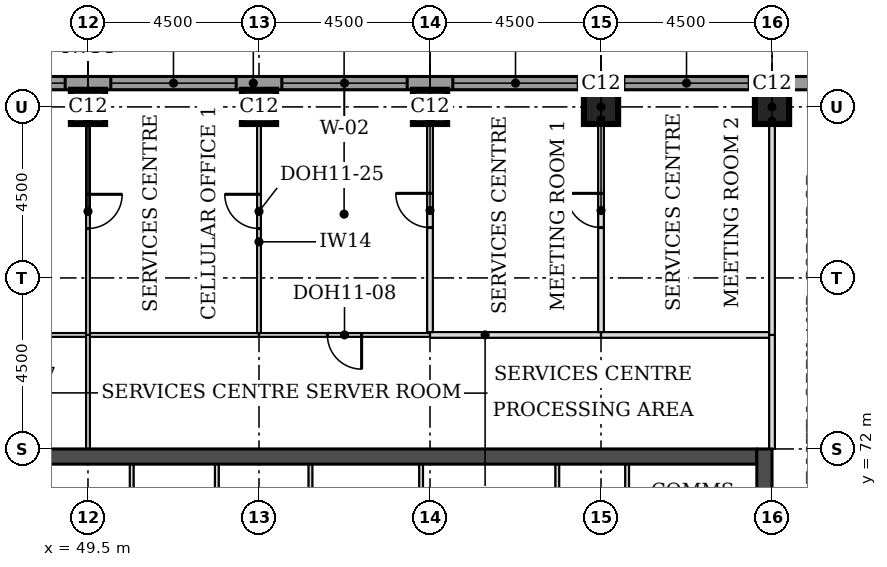
"""IFC4 building model, lengths in metres.
Left out: names, types, materials, properties, quantities, classifications, styles, units other than length and angle.
Written with IfcOpenShell. Run it as: python <this file> out.ifc"""

import sys

from ifc_helpers import new_model, si_unit, direction, frame, frame_2d, origin, origin_2d, place, context, subcontext, project, spatial, rectangle, extrude, element, fill, save


model = new_model("IFC4")
c1 = context("Model", 3, precision=1e-05, world=origin(), true_north=direction((0.0, 1.0)))
c2 = subcontext(c1, "Body", "Model", "MODEL_VIEW")
j1 = project(units=[si_unit("LENGTHUNIT", "METRE"), si_unit("PLANEANGLEUNIT", "RADIAN")], contexts=[c1])
p1 = place(None, origin())
s1 = spatial("IfcSite", under=j1, at=p1, CompositionType="ELEMENT")
p2 = place(p1, origin())
s2 = spatial("IfcBuilding", under=s1, at=p2, CompositionType="ELEMENT")
p3 = place(p2, frame((0.0, 0.0, 234.1)))
s3 = spatial("IfcBuildingStorey", under=s2, at=p3, CompositionType="ELEMENT", Elevation=234.1)
for number, where, z_axis, x_axis in (
    (1, (49.5, 81.0, 0.0), (0.0, 0.0, 1.0), (1.0, 0.0, 0.0)),
    (2, (54.0, 81.0, 0.0), (0.0, 0.0, 1.0), (1.0, 0.0, 0.0)),
    (3, (58.5, 81.0, 0.0), (0.0, 0.0, 1.0), (1.0, 0.0, 0.0)),
    (4, (63.0, 81.0, 0.0), (0.0, 0.0, 1.0), (1.0, 0.0, 0.0)),
    (5, (67.5, 81.0, 0.0), (0.0, 0.0, 1.0), (1.0, 0.0, 0.0)),
):
    element("IfcColumn", number, at=place(p3, frame(where, z_axis=z_axis, x_axis=x_axis)), inside=s3, PredefinedType="COLUMN", context=c2, shape_type="SweptSolid", body=[
        extrude(rectangle(XDim=0.9, YDim=0.9, at=origin_2d()), origin(), (0.0, 0.0, 1.0), 3.7),
    ])
p4 = place(p3, frame((45.4, 71.8, 0.0), z_axis=(0.0, 0.0, 1.0), x_axis=(1.0, 0.0, 0.0)))
e6 = element("IfcWall", 6, at=p4, inside=s3, PredefinedType="SHEAR", context=c2, shape_type="SweptSolid", body=[
    extrude(rectangle(XDim=21.7, YDim=0.4, at=frame_2d((10.85, 0.0))), origin(), (0.0, 0.0, 1.0), 3.7),
])
p5 = place(p3, frame((67.3, 49.5, 0.0), z_axis=(0.0, 0.0, 1.0), x_axis=(0.0, 1.0, 0.0)))
e7 = element("IfcWall", 7, at=p5, inside=s3, PredefinedType="SHEAR", context=c2, shape_type="SweptSolid", body=[
    extrude(rectangle(XDim=22.5, YDim=0.4, at=frame_2d((11.25, 0.0))), origin(), (0.0, 0.0, 1.0), 3.7),
])
p6 = place(p5, frame((4.2, 0.0, 0.0)))
e8 = element("IfcOpeningElement", 8, at=p6, cuts=e7, PredefinedType="OPENING", context=c2, shape_type="SweptSolid", body=[
    extrude(rectangle(XDim=1.8, YDim=2.1, at=frame_2d((0.9, 1.05))), frame((0.0, 0.21, 0.0), z_axis=(0.0, -1.0, 0.0), x_axis=(1.0, 0.0, 0.0)), (0.0, 0.0, 1.0), 0.42),
])
p7 = place(p5, frame((6.9, 0.0, 0.0)))
e9 = element("IfcOpeningElement", 9, at=p7, cuts=e7, PredefinedType="OPENING", context=c2, shape_type="SweptSolid", body=[
    extrude(rectangle(XDim=1.1, YDim=2.1, at=frame_2d((0.55, 1.05))), frame((0.0, 0.21, 0.0), z_axis=(0.0, -1.0, 0.0), x_axis=(1.0, 0.0, 0.0)), (0.0, 0.0, 1.0), 0.42),
])
p8 = place(p5, frame((13.6, 0.0, 0.0)))
e10 = element("IfcOpeningElement", 10, at=p8, cuts=e7, PredefinedType="OPENING", context=c2, shape_type="SweptSolid", body=[
    extrude(rectangle(XDim=1.1, YDim=2.1, at=frame_2d((0.55, 1.05))), frame((0.0, 0.21, 0.0), z_axis=(0.0, -1.0, 0.0), x_axis=(1.0, 0.0, 0.0)), (0.0, 0.0, 1.0), 0.42),
])
p9 = place(p5, frame((16.5, 0.0, 0.0)))
e11 = element("IfcOpeningElement", 11, at=p9, cuts=e7, PredefinedType="OPENING", context=c2, shape_type="SweptSolid", body=[
    extrude(rectangle(XDim=1.8, YDim=2.1, at=frame_2d((0.9, 1.05))), frame((0.0, 0.21, 0.0), z_axis=(0.0, -1.0, 0.0), x_axis=(1.0, 0.0, 0.0)), (0.0, 0.0, 1.0), 0.42),
])
p10 = place(p3, frame((72.331, 81.625, 0.0), z_axis=(0.0, 0.0, 1.0), x_axis=(-1.0, 0.0, 0.0)))
e12 = element("IfcWall", 12, at=p10, inside=s3, PredefinedType="STANDARD", context=c2, shape_type="SweptSolid", body=[
    extrude(rectangle(XDim=32.163, YDim=0.35, at=frame_2d((16.081, 0.0))), origin(), (0.0, 0.0, 1.0), 3.525),
])
p11 = place(p10, frame((5.431, 0.0, 0.9)))
e13 = element("IfcOpeningElement", 13, at=p11, cuts=e12, PredefinedType="OPENING", context=c2, shape_type="SweptSolid", body=[
    extrude(rectangle(XDim=3.3, YDim=1.9, at=frame_2d((1.65, 0.95))), frame((0.0, 0.185, 0.0), z_axis=(0.0, -1.0, 0.0), x_axis=(1.0, 0.0, 0.0)), (0.0, 0.0, 1.0), 0.37),
])
p12 = place(p10, frame((9.931, 0.0, 0.9)))
e14 = element("IfcOpeningElement", 14, at=p12, cuts=e12, PredefinedType="OPENING", context=c2, shape_type="SweptSolid", body=[
    extrude(rectangle(XDim=3.3, YDim=1.9, at=frame_2d((1.65, 0.95))), frame((0.0, 0.185, 0.0), z_axis=(0.0, -1.0, 0.0), x_axis=(1.0, 0.0, 0.0)), (0.0, 0.0, 1.0), 0.37),
])
p13 = place(p10, frame((14.431, 0.0, 0.9)))
e15 = element("IfcOpeningElement", 15, at=p13, cuts=e12, PredefinedType="OPENING", context=c2, shape_type="SweptSolid", body=[
    extrude(rectangle(XDim=3.3, YDim=1.9, at=frame_2d((1.65, 0.95))), frame((0.0, 0.185, 0.0), z_axis=(0.0, -1.0, 0.0), x_axis=(1.0, 0.0, 0.0)), (0.0, 0.0, 1.0), 0.37),
])
p14 = place(p10, frame((18.931, 0.0, 0.9)))
e16 = element("IfcOpeningElement", 16, at=p14, cuts=e12, PredefinedType="OPENING", context=c2, shape_type="SweptSolid", body=[
    extrude(rectangle(XDim=3.3, YDim=1.9, at=frame_2d((1.65, 0.95))), frame((0.0, 0.185, 0.0), z_axis=(0.0, -1.0, 0.0), x_axis=(1.0, 0.0, 0.0)), (0.0, 0.0, 1.0), 0.37),
])
p15 = place(p10, frame((23.431, 0.0, 0.9)))
e17 = element("IfcOpeningElement", 17, at=p15, cuts=e12, PredefinedType="OPENING", context=c2, shape_type="SweptSolid", body=[
    extrude(rectangle(XDim=3.3, YDim=1.9, at=frame_2d((1.65, 0.95))), frame((0.0, 0.185, 0.0), z_axis=(0.0, -1.0, 0.0), x_axis=(1.0, 0.0, 0.0)), (0.0, 0.0, 1.0), 0.37),
])
p16 = place(p3, frame((45.075, 75.0, 0.0), z_axis=(0.0, 0.0, 1.0), x_axis=(1.0, 0.0, 0.0)))
e18 = element("IfcWall", 18, at=p16, inside=s3, PredefinedType="PARTITIONING", context=c2, shape_type="SweptSolid", body=[
    extrude(rectangle(XDim=4.375, YDim=0.1, at=frame_2d((2.188, 0.0))), origin(), (0.0, 0.0, 1.0), 3.55),
])
p17 = place(p16, frame((1.75, 0.0, 0.0)))
e19 = element("IfcOpeningElement", 19, at=p17, cuts=e18, PredefinedType="OPENING", context=c2, shape_type="SweptSolid", body=[
    extrude(rectangle(XDim=0.9, YDim=2.1, at=frame_2d((0.45, 1.05))), frame((0.0, 0.06, 0.0), z_axis=(0.0, -1.0, 0.0), x_axis=(1.0, 0.0, 0.0)), (0.0, 0.0, 1.0), 0.12),
])
p18 = place(p3, frame((49.55, 75.0, 0.0), z_axis=(0.0, 0.0, 1.0), x_axis=(1.0, 0.0, 0.0)))
e20 = element("IfcWall", 20, at=p18, inside=s3, PredefinedType="PARTITIONING", context=c2, shape_type="SweptSolid", body=[
    extrude(rectangle(XDim=4.45, YDim=0.1, at=frame_2d((2.225, 0.0))), origin(), (0.0, 0.0, 1.0), 3.55),
])
p19 = place(p3, frame((54.0, 75.0, 0.0), z_axis=(0.0, 0.0, 1.0), x_axis=(1.0, 0.0, 0.0)))
e21 = element("IfcWall", 21, at=p19, inside=s3, PredefinedType="PARTITIONING", context=c2, shape_type="SweptSolid", body=[
    extrude(rectangle(XDim=4.5, YDim=0.1, at=frame_2d((2.25, 0.0))), origin(), (0.0, 0.0, 1.0), 3.55),
])
p20 = place(p19, frame((1.8, 0.0, 0.0)))
e22 = element("IfcOpeningElement", 22, at=p20, cuts=e21, PredefinedType="OPENING", context=c2, shape_type="SweptSolid", body=[
    extrude(rectangle(XDim=0.9, YDim=2.1, at=frame_2d((0.45, 1.05))), frame((0.0, 0.06, 0.0), z_axis=(0.0, -1.0, 0.0), x_axis=(1.0, 0.0, 0.0)), (0.0, 0.0, 1.0), 0.12),
])
p21 = place(p3, frame((58.5, 75.0, 0.0), z_axis=(0.0, 0.0, 1.0), x_axis=(1.0, 0.0, 0.0)))
e23 = element("IfcWall", 23, at=p21, inside=s3, PredefinedType="PARTITIONING", context=c2, shape_type="SweptSolid", body=[
    extrude(rectangle(XDim=4.5, YDim=0.15, at=frame_2d((2.25, 0.0))), origin(), (0.0, 0.0, 1.0), 3.55),
])
p22 = place(p3, frame((63.0, 75.0, 0.0), z_axis=(0.0, 0.0, 1.0), x_axis=(1.0, 0.0, 0.0)))
e24 = element("IfcWall", 24, at=p22, inside=s3, PredefinedType="PARTITIONING", context=c2, shape_type="SweptSolid", body=[
    extrude(rectangle(XDim=4.425, YDim=0.15, at=frame_2d((2.212, 0.0))), origin(), (0.0, 0.0, 1.0), 3.55),
])
p23 = place(p3, frame((49.5, 72.0, 0.0), z_axis=(0.0, 0.0, 1.0), x_axis=(0.0, 1.0, 0.0)))
e25 = element("IfcWall", 25, at=p23, inside=s3, PredefinedType="PARTITIONING", context=c2, shape_type="SweptSolid", body=[
    extrude(rectangle(XDim=3.0, YDim=0.1, at=frame_2d((1.5, 0.0))), origin(), (0.0, 0.0, 1.0), 3.55),
])
p24 = place(p3, frame((67.5, 72.0, 0.0), z_axis=(0.0, 0.0, 1.0), x_axis=(0.0, 1.0, 0.0)))
e26 = element("IfcWall", 26, at=p24, inside=s3, PredefinedType="PARTITIONING", context=c2, shape_type="SweptSolid", body=[
    extrude(rectangle(XDim=3.0, YDim=0.15, at=frame_2d((1.5, 0.0))), origin(), (0.0, 0.0, 1.0), 3.022),
])
p25 = place(p3, frame((49.5, 75.0, 0.0), z_axis=(0.0, 0.0, 1.0), x_axis=(0.0, 1.0, 0.0)))
e27 = element("IfcWall", 27, at=p25, inside=s3, PredefinedType="PARTITIONING", context=c2, shape_type="SweptSolid", body=[
    extrude(rectangle(XDim=6.45, YDim=0.1, at=frame_2d((3.225, 0.0))), origin(), (0.0, 0.0, 1.0), 3.55),
])
p26 = place(p25, frame((2.8, 0.0, 0.0)))
e28 = element("IfcOpeningElement", 28, at=p26, cuts=e27, PredefinedType="OPENING", context=c2, shape_type="SweptSolid", body=[
    extrude(rectangle(XDim=0.9, YDim=2.1, at=frame_2d((0.45, 1.05))), frame((0.0, 0.06, 0.0), z_axis=(0.0, -1.0, 0.0), x_axis=(1.0, 0.0, 0.0)), (0.0, 0.0, 1.0), 0.12),
])
p27 = place(p3, frame((67.5, 75.0, 0.0), z_axis=(0.0, 0.0, 1.0), x_axis=(0.0, 1.0, 0.0)))
e29 = element("IfcWall", 29, at=p27, inside=s3, PredefinedType="PARTITIONING", context=c2, shape_type="SweptSolid", body=[
    extrude(rectangle(XDim=6.45, YDim=0.15, at=frame_2d((3.225, 0.0))), origin(), (0.0, 0.0, 1.0), 3.022),
])
p28 = place(p3, frame((54.0, 75.05, 0.0), z_axis=(0.0, 0.0, 1.0), x_axis=(0.0, 1.0, 0.0)))
e30 = element("IfcWall", 30, at=p28, inside=s3, PredefinedType="PARTITIONING", context=c2, shape_type="SweptSolid", body=[
    extrude(rectangle(XDim=6.4, YDim=0.1, at=frame_2d((3.2, 0.0))), origin(), (0.0, 0.0, 1.0), 3.55),
])
p29 = place(p28, frame((2.75, 0.0, 0.0)))
e31 = element("IfcOpeningElement", 31, at=p29, cuts=e30, PredefinedType="OPENING", context=c2, shape_type="SweptSolid", body=[
    extrude(rectangle(XDim=0.9, YDim=2.1, at=frame_2d((0.45, 1.05))), frame((0.0, 0.06, 0.0), z_axis=(0.0, -1.0, 0.0), x_axis=(1.0, 0.0, 0.0)), (0.0, 0.0, 1.0), 0.12),
])
p30 = place(p3, frame((58.5, 75.075, 0.0), z_axis=(0.0, 0.0, 1.0), x_axis=(0.0, 1.0, 0.0)))
e32 = element("IfcWall", 32, at=p30, inside=s3, PredefinedType="PARTITIONING", context=c2, shape_type="SweptSolid", body=[
    extrude(rectangle(XDim=6.375, YDim=0.15, at=frame_2d((3.188, 0.0))), origin(), (0.0, 0.0, 1.0), 3.55),
])
p31 = place(p30, frame((2.75, 0.0, 0.0)))
e33 = element("IfcOpeningElement", 33, at=p31, cuts=e32, PredefinedType="OPENING", context=c2, shape_type="SweptSolid", body=[
    extrude(rectangle(XDim=0.9, YDim=2.1, at=frame_2d((0.45, 1.05))), frame((0.0, 0.085, 0.0), z_axis=(0.0, -1.0, 0.0), x_axis=(1.0, 0.0, 0.0)), (0.0, 0.0, 1.0), 0.17),
])
p32 = place(p3, frame((63.0, 75.075, 0.0), z_axis=(0.0, 0.0, 1.0), x_axis=(0.0, 1.0, 0.0)))
e34 = element("IfcWall", 34, at=p32, inside=s3, PredefinedType="PARTITIONING", context=c2, shape_type="SweptSolid", body=[
    extrude(rectangle(XDim=6.375, YDim=0.15, at=frame_2d((3.188, 0.0))), origin(), (0.0, 0.0, 1.0), 3.55),
])
p33 = place(p32, frame((2.75, 0.0, 0.0)))
e35 = element("IfcOpeningElement", 35, at=p33, cuts=e34, PredefinedType="OPENING", context=c2, shape_type="SweptSolid", body=[
    extrude(rectangle(XDim=0.9, YDim=2.1, at=frame_2d((0.45, 1.05))), frame((0.0, 0.085, 0.0), z_axis=(0.0, -1.0, 0.0), x_axis=(1.0, 0.0, 0.0)), (0.0, 0.0, 1.0), 0.17),
])
for number, where, z_axis, x_axis in (
    (36, (50.65, 68.5, 0.0), (0.0, 0.0, 1.0), (0.0, 1.0, 0.0)),
    (37, (52.89, 68.5, 0.0), (0.0, 0.0, 1.0), (0.0, 1.0, 0.0)),
    (38, (55.354, 68.5, 0.0), (0.0, 0.0, 1.0), (0.0, 1.0, 0.0)),
    (39, (58.266, 68.5, 0.0), (0.0, 0.0, 1.0), (0.0, 1.0, 0.0)),
    (40, (61.85, 68.5, 0.0), (0.0, 0.0, 1.0), (0.0, 1.0, 0.0)),
    (41, (63.688, 68.5, 0.0), (0.0, 0.0, 1.0), (0.0, 1.0, 0.0)),
):
    element("IfcWall", number, at=place(p3, frame(where, z_axis=z_axis, x_axis=x_axis)), inside=s3, PredefinedType="PARTITIONING", context=c2, shape_type="SweptSolid", body=[
        extrude(rectangle(XDim=3.1, YDim=0.1, at=frame_2d((1.55, 0.0))), origin(), (0.0, 0.0, 1.0), 3.55),
    ])
p34 = place(p11, origin())
e42 = element("IfcWindow", 42, at=p34, inside=s3, PartitioningType="SINGLE_PANEL", PredefinedType="WINDOW", context=c2, shape_type="SweptSolid", body=[
    extrude(rectangle(XDim=3.3, YDim=1.9, at=frame_2d((1.65, 0.95))), frame((0.0, 0.085, 0.0), z_axis=(0.0, -1.0, 0.0), x_axis=(1.0, 0.0, 0.0)), (0.0, 0.0, 1.0), 0.06),
])
fill(e13, e42)
p35 = place(p12, origin())
e43 = element("IfcWindow", 43, at=p35, inside=s3, PartitioningType="SINGLE_PANEL", PredefinedType="WINDOW", context=c2, shape_type="SweptSolid", body=[
    extrude(rectangle(XDim=3.3, YDim=1.9, at=frame_2d((1.65, 0.95))), frame((0.0, 0.085, 0.0), z_axis=(0.0, -1.0, 0.0), x_axis=(1.0, 0.0, 0.0)), (0.0, 0.0, 1.0), 0.06),
])
fill(e14, e43)
p36 = place(p13, origin())
e44 = element("IfcWindow", 44, at=p36, inside=s3, PartitioningType="SINGLE_PANEL", PredefinedType="WINDOW", context=c2, shape_type="SweptSolid", body=[
    extrude(rectangle(XDim=3.3, YDim=1.9, at=frame_2d((1.65, 0.95))), frame((0.0, 0.085, 0.0), z_axis=(0.0, -1.0, 0.0), x_axis=(1.0, 0.0, 0.0)), (0.0, 0.0, 1.0), 0.06),
])
fill(e15, e44)
p37 = place(p14, origin())
e45 = element("IfcWindow", 45, at=p37, inside=s3, PartitioningType="SINGLE_PANEL", PredefinedType="WINDOW", context=c2, shape_type="SweptSolid", body=[
    extrude(rectangle(XDim=3.3, YDim=1.9, at=frame_2d((1.65, 0.95))), frame((0.0, 0.085, 0.0), z_axis=(0.0, -1.0, 0.0), x_axis=(1.0, 0.0, 0.0)), (0.0, 0.0, 1.0), 0.06),
])
fill(e16, e45)
p38 = place(p15, origin())
e46 = element("IfcWindow", 46, at=p38, inside=s3, PartitioningType="SINGLE_PANEL", PredefinedType="WINDOW", context=c2, shape_type="SweptSolid", body=[
    extrude(rectangle(XDim=3.3, YDim=1.9, at=frame_2d((1.65, 0.95))), frame((0.0, 0.085, 0.0), z_axis=(0.0, -1.0, 0.0), x_axis=(1.0, 0.0, 0.0)), (0.0, 0.0, 1.0), 0.06),
])
fill(e17, e46)
p39 = place(p26, frame((0.9, 0.0, 0.0), z_axis=(0.0, 0.0, 1.0), x_axis=(-1.0, 0.0, 0.0)))
e47 = element("IfcDoor", 47, at=p39, inside=s3, OperationType="SINGLE_SWING_LEFT", PredefinedType="DOOR", context=c2, shape_type="SweptSolid", body=[
    extrude(rectangle(XDim=0.9, YDim=2.1, at=frame_2d((0.45, 1.05))), frame((0.0, 0.025, 0.0), z_axis=(0.0, -1.0, 0.0), x_axis=(1.0, 0.0, 0.0)), (0.0, 0.0, 1.0), 0.05),
])
fill(e28, e47)
p40 = place(p29, origin())
e48 = element("IfcDoor", 48, at=p40, inside=s3, OperationType="SINGLE_SWING_RIGHT", PredefinedType="DOOR", context=c2, shape_type="SweptSolid", body=[
    extrude(rectangle(XDim=0.9, YDim=2.1, at=frame_2d((0.45, 1.05))), frame((0.0, 0.025, 0.0), z_axis=(0.0, -1.0, 0.0), x_axis=(1.0, 0.0, 0.0)), (0.0, 0.0, 1.0), 0.05),
])
fill(e31, e48)
p41 = place(p31, origin())
e49 = element("IfcDoor", 49, at=p41, inside=s3, OperationType="SINGLE_SWING_RIGHT", PredefinedType="DOOR", context=c2, shape_type="SweptSolid", body=[
    extrude(rectangle(XDim=0.9, YDim=2.1, at=frame_2d((0.45, 1.05))), frame((0.0, 0.025, 0.0), z_axis=(0.0, -1.0, 0.0), x_axis=(1.0, 0.0, 0.0)), (0.0, 0.0, 1.0), 0.05),
])
fill(e33, e49)
p42 = place(p33, origin())
e50 = element("IfcDoor", 50, at=p42, inside=s3, OperationType="SINGLE_SWING_RIGHT", PredefinedType="DOOR", context=c2, shape_type="SweptSolid", body=[
    extrude(rectangle(XDim=0.9, YDim=2.1, at=frame_2d((0.45, 1.05))), frame((0.0, 0.025, 0.0), z_axis=(0.0, -1.0, 0.0), x_axis=(1.0, 0.0, 0.0)), (0.0, 0.0, 1.0), 0.05),
])
fill(e35, e50)
p43 = place(p20, frame((0.9, 0.0, 0.0), z_axis=(0.0, 0.0, 1.0), x_axis=(-1.0, 0.0, 0.0)))
e51 = element("IfcDoor", 51, at=p43, inside=s3, OperationType="SINGLE_SWING_LEFT", PredefinedType="DOOR", context=c2, shape_type="SweptSolid", body=[
    extrude(rectangle(XDim=0.9, YDim=2.1, at=frame_2d((0.45, 1.05))), frame((0.0, 0.025, 0.0), z_axis=(0.0, -1.0, 0.0), x_axis=(1.0, 0.0, 0.0)), (0.0, 0.0, 1.0), 0.05),
])
fill(e22, e51)
save(model, sys.argv[1])
